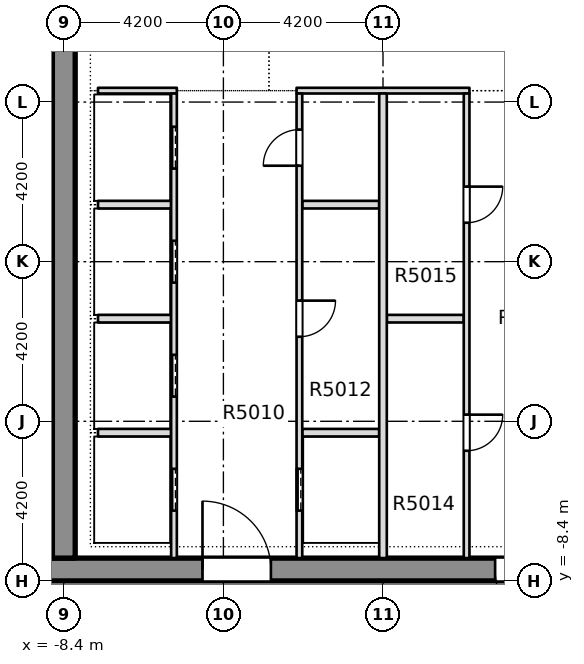
"""IFC4 building model, lengths in metres.
Left out: names, types, materials, properties, quantities, classifications, styles, units other than length and angle.
Written with IfcOpenShell. Run it as: python <this file> out.ifc"""

import sys

from ifc_helpers import new_model, si_unit, direction, frame, frame_2d, origin, place, context, subcontext, project, spatial, rectangle, extrude, element, fill, save


model = new_model("IFC4")
c1 = context("Model", 3, precision=1e-05, world=origin(), true_north=direction((0.0, 1.0)))
c2 = subcontext(c1, "Body", "Model", "MODEL_VIEW")
j1 = project(units=[si_unit("LENGTHUNIT", "METRE"), si_unit("PLANEANGLEUNIT", "RADIAN")], contexts=[c1])
p1 = place(None, origin())
s1 = spatial("IfcSite", under=j1, at=p1, CompositionType="ELEMENT")
p2 = place(p1, origin())
s2 = spatial("IfcBuilding", under=s1, at=p2, CompositionType="ELEMENT")
p3 = place(p2, frame((0.0, 0.0, 192.8)))
s3 = spatial("IfcBuildingStorey", under=s2, at=p3, CompositionType="ELEMENT", Elevation=192.8)
p4 = place(p3, frame((-12.0, -8.1, -0.4), z_axis=(0.0, 0.0, 1.0), x_axis=(1.0, 0.0, 0.0)))
e1 = element("IfcWall", 1, at=p4, inside=s3, PredefinedType="SHEAR", context=c2, shape_type="SweptSolid", body=[
    extrude(rectangle(XDim=24.0, YDim=0.6, at=frame_2d((12.0, 0.0))), origin(), (0.0, 0.0, 1.0), 3.45),
])
p5 = place(p4, frame((7.25, 0.0, 0.4)))
e2 = element("IfcOpeningElement", 2, at=p5, cuts=e1, PredefinedType="OPENING", context=c2, shape_type="SweptSolid", body=[
    extrude(rectangle(XDim=1.8, YDim=2.1, at=frame_2d((0.9, 1.05))), frame((0.0, 0.31, 0.0), z_axis=(0.0, -1.0, 0.0), x_axis=(1.0, 0.0, 0.0)), (0.0, 0.0, 1.0), 0.62),
])
p6 = place(p4, frame((14.95, 0.0, 0.4)))
e3 = element("IfcOpeningElement", 3, at=p6, cuts=e1, PredefinedType="OPENING", context=c2, shape_type="SweptSolid", body=[
    extrude(rectangle(XDim=1.8, YDim=2.1, at=frame_2d((0.9, 1.05))), frame((0.0, 0.31, 0.0), z_axis=(0.0, -1.0, 0.0), x_axis=(1.0, 0.0, 0.0)), (0.0, 0.0, 1.0), 0.62),
])
p7 = place(p3, frame((-8.4, -7.8, -0.4), z_axis=(0.0, 0.0, 1.0), x_axis=(0.0, 1.0, 0.0)))
e4 = element("IfcWall", 4, at=p7, inside=s3, PredefinedType="SHEAR", context=c2, shape_type="SweptSolid", body=[
    extrude(rectangle(XDim=28.95, YDim=0.6, at=frame_2d((14.475, 0.0))), origin(), (0.0, 0.0, 1.0), 3.45),
])
p8 = place(p7, frame((18.7, 0.0, 0.4)))
e5 = element("IfcOpeningElement", 5, at=p8, cuts=e4, PredefinedType="OPENING", context=c2, shape_type="SweptSolid", body=[
    extrude(rectangle(XDim=1.2, YDim=2.1, at=frame_2d((0.6, 1.05))), frame((0.0, 0.31, 0.0), z_axis=(0.0, -1.0, 0.0), x_axis=(1.0, 0.0, 0.0)), (0.0, 0.0, 1.0), 0.62),
])
p9 = place(p3, frame((-7.5, -4.5, 0.0), z_axis=(0.0, 0.0, 1.0), x_axis=(1.0, 0.0, 0.0)))
e6 = element("IfcWall", 6, at=p9, inside=s3, PredefinedType="PARTITIONING", context=c2, shape_type="SweptSolid", body=[
    extrude(rectangle(XDim=1.925, YDim=0.2, at=frame_2d((0.962, 0.0))), origin(), (0.0, 0.0, 1.0), 3.05),
])
p10 = place(p3, frame((-2.125, -4.5, 0.0), z_axis=(0.0, 0.0, 1.0), x_axis=(1.0, 0.0, 0.0)))
e7 = element("IfcWall", 7, at=p10, inside=s3, PredefinedType="PARTITIONING", context=c2, shape_type="SweptSolid", body=[
    extrude(rectangle(XDim=2.025, YDim=0.2, at=frame_2d((1.012, 0.0))), origin(), (0.0, 0.0, 1.0), 3.05),
])
p11 = place(p3, frame((-7.5, -1.5, 0.0), z_axis=(0.0, 0.0, 1.0), x_axis=(1.0, 0.0, 0.0)))
e8 = element("IfcWall", 8, at=p11, inside=s3, PredefinedType="PARTITIONING", context=c2, shape_type="SweptSolid", body=[
    extrude(rectangle(XDim=1.925, YDim=0.2, at=frame_2d((0.962, 0.0))), origin(), (0.0, 0.0, 1.0), 3.05),
])
p12 = place(p3, frame((0.1, -1.5, 0.0), z_axis=(0.0, 0.0, 1.0), x_axis=(1.0, 0.0, 0.0)))
e9 = element("IfcWall", 9, at=p12, inside=s3, PredefinedType="PARTITIONING", context=c2, shape_type="SweptSolid", body=[
    extrude(rectangle(XDim=2.025, YDim=0.2, at=frame_2d((1.012, 0.0))), origin(), (0.0, 0.0, 1.0), 3.05),
])
p13 = place(p3, frame((-7.5, 1.5, 0.0), z_axis=(0.0, 0.0, 1.0), x_axis=(1.0, 0.0, 0.0)))
e10 = element("IfcWall", 10, at=p13, inside=s3, PredefinedType="PARTITIONING", context=c2, shape_type="SweptSolid", body=[
    extrude(rectangle(XDim=1.925, YDim=0.2, at=frame_2d((0.962, 0.0))), origin(), (0.0, 0.0, 1.0), 3.05),
])
p14 = place(p3, frame((-2.125, 1.5, 0.0), z_axis=(0.0, 0.0, 1.0), x_axis=(1.0, 0.0, 0.0)))
e11 = element("IfcWall", 11, at=p14, inside=s3, PredefinedType="PARTITIONING", context=c2, shape_type="SweptSolid", body=[
    extrude(rectangle(XDim=2.025, YDim=0.2, at=frame_2d((1.012, 0.0))), origin(), (0.0, 0.0, 1.0), 3.05),
])
p15 = place(p3, frame((-7.5, 4.5, 0.0), z_axis=(0.0, 0.0, 1.0), x_axis=(1.0, 0.0, 0.0)))
e12 = element("IfcWall", 12, at=p15, inside=s3, PredefinedType="PARTITIONING", context=c2, shape_type="SweptSolid", body=[
    extrude(rectangle(XDim=2.075, YDim=0.15, at=frame_2d((1.038, 0.0))), origin(), (0.0, 0.0, 1.0), 3.05),
])
p16 = place(p3, frame((-2.275, 4.5, 0.0), z_axis=(0.0, 0.0, 1.0), x_axis=(1.0, 0.0, 0.0)))
e13 = element("IfcWall", 13, at=p16, inside=s3, PredefinedType="PARTITIONING", context=c2, shape_type="SweptSolid", body=[
    extrude(rectangle(XDim=4.55, YDim=0.15, at=frame_2d((2.275, 0.0))), origin(), (0.0, 0.0, 1.0), 3.05),
])
p17 = place(p3, frame((-5.5, -7.799, 0.0), z_axis=(0.0, 0.0, 1.0), x_axis=(0.0, 1.0, 0.0)))
e14 = element("IfcWall", 14, at=p17, inside=s3, PredefinedType="PARTITIONING", context=c2, shape_type="SweptSolid", body=[
    extrude(rectangle(XDim=12.224, YDim=0.15, at=frame_2d((6.112, 0.0))), origin(), (0.0, 0.0, 1.0), 3.05),
])
p18 = place(p17, frame((1.249, 0.0, 0.0)))
e15 = element("IfcOpeningElement", 15, at=p18, cuts=e14, PredefinedType="OPENING", context=c2, shape_type="SweptSolid", body=[
    extrude(rectangle(XDim=1.1, YDim=2.1, at=frame_2d((0.55, 1.05))), frame((0.0, 0.085, 0.0), z_axis=(0.0, -1.0, 0.0), x_axis=(1.0, 0.0, 0.0)), (0.0, 0.0, 1.0), 0.17),
])
p19 = place(p17, frame((4.249, 0.0, 0.0)))
e16 = element("IfcOpeningElement", 16, at=p19, cuts=e14, PredefinedType="OPENING", context=c2, shape_type="SweptSolid", body=[
    extrude(rectangle(XDim=1.1, YDim=2.1, at=frame_2d((0.55, 1.05))), frame((0.0, 0.085, 0.0), z_axis=(0.0, -1.0, 0.0), x_axis=(1.0, 0.0, 0.0)), (0.0, 0.0, 1.0), 0.17),
])
p20 = place(p17, frame((7.249, 0.0, 0.0)))
e17 = element("IfcOpeningElement", 17, at=p20, cuts=e14, PredefinedType="OPENING", context=c2, shape_type="SweptSolid", body=[
    extrude(rectangle(XDim=1.1, YDim=2.1, at=frame_2d((0.55, 1.05))), frame((0.0, 0.085, 0.0), z_axis=(0.0, -1.0, 0.0), x_axis=(1.0, 0.0, 0.0)), (0.0, 0.0, 1.0), 0.17),
])
p21 = place(p17, frame((10.249, 0.0, 0.0)))
e18 = element("IfcOpeningElement", 18, at=p21, cuts=e14, PredefinedType="OPENING", context=c2, shape_type="SweptSolid", body=[
    extrude(rectangle(XDim=1.1, YDim=2.1, at=frame_2d((0.55, 1.05))), frame((0.0, 0.085, 0.0), z_axis=(0.0, -1.0, 0.0), x_axis=(1.0, 0.0, 0.0)), (0.0, 0.0, 1.0), 0.17),
])
p22 = place(p3, frame((-2.2, -7.799, 0.0), z_axis=(0.0, 0.0, 1.0), x_axis=(0.0, 1.0, 0.0)))
e19 = element("IfcWall", 19, at=p22, inside=s3, PredefinedType="PARTITIONING", context=c2, shape_type="SweptSolid", body=[
    extrude(rectangle(XDim=12.224, YDim=0.15, at=frame_2d((6.112, 0.0))), origin(), (0.0, 0.0, 1.0), 3.05),
])
p23 = place(p22, frame((1.249, 0.0, 0.0)))
e20 = element("IfcOpeningElement", 20, at=p23, cuts=e19, PredefinedType="OPENING", context=c2, shape_type="SweptSolid", body=[
    extrude(rectangle(XDim=1.1, YDim=2.1, at=frame_2d((0.55, 1.05))), frame((0.0, 0.085, 0.0), z_axis=(0.0, -1.0, 0.0), x_axis=(1.0, 0.0, 0.0)), (0.0, 0.0, 1.0), 0.17),
])
p24 = place(p22, frame((5.824, 0.0, 0.0)))
e21 = element("IfcOpeningElement", 21, at=p24, cuts=e19, PredefinedType="OPENING", context=c2, shape_type="SweptSolid", body=[
    extrude(rectangle(XDim=0.95, YDim=2.1, at=frame_2d((0.475, 1.05))), frame((0.0, 0.085, 0.0), z_axis=(0.0, -1.0, 0.0), x_axis=(1.0, 0.0, 0.0)), (0.0, 0.0, 1.0), 0.17),
])
p25 = place(p22, frame((10.324, 0.0, 0.0)))
e22 = element("IfcOpeningElement", 22, at=p25, cuts=e19, PredefinedType="OPENING", context=c2, shape_type="SweptSolid", body=[
    extrude(rectangle(XDim=0.95, YDim=2.1, at=frame_2d((0.475, 1.05))), frame((0.0, 0.085, 0.0), z_axis=(0.0, -1.0, 0.0), x_axis=(1.0, 0.0, 0.0)), (0.0, 0.0, 1.0), 0.17),
])
p26 = place(p3, frame((0.0, -7.799, 0.0), z_axis=(0.0, 0.0, 1.0), x_axis=(0.0, 1.0, 0.0)))
e23 = element("IfcWall", 23, at=p26, inside=s3, PredefinedType="PARTITIONING", context=c2, shape_type="SweptSolid", body=[
    extrude(rectangle(XDim=12.224, YDim=0.2, at=frame_2d((6.112, 0.0))), origin(), (0.0, 0.0, 1.0), 3.05),
])
p27 = place(p3, frame((2.2, -7.799, 0.0), z_axis=(0.0, 0.0, 1.0), x_axis=(0.0, 1.0, 0.0)))
e24 = element("IfcWall", 24, at=p27, inside=s3, PredefinedType="PARTITIONING", context=c2, shape_type="SweptSolid", body=[
    extrude(rectangle(XDim=12.224, YDim=0.15, at=frame_2d((6.112, 0.0))), origin(), (0.0, 0.0, 1.0), 3.05),
])
p28 = place(p27, frame((2.824, 0.0, 0.0)))
e25 = element("IfcOpeningElement", 25, at=p28, cuts=e24, PredefinedType="OPENING", context=c2, shape_type="SweptSolid", body=[
    extrude(rectangle(XDim=0.95, YDim=2.1, at=frame_2d((0.475, 1.05))), frame((0.0, 0.085, 0.0), z_axis=(0.0, -1.0, 0.0), x_axis=(1.0, 0.0, 0.0)), (0.0, 0.0, 1.0), 0.17),
])
p29 = place(p27, frame((8.824, 0.0, 0.0)))
e26 = element("IfcOpeningElement", 26, at=p29, cuts=e24, PredefinedType="OPENING", context=c2, shape_type="SweptSolid", body=[
    extrude(rectangle(XDim=0.95, YDim=2.1, at=frame_2d((0.475, 1.05))), frame((0.0, 0.085, 0.0), z_axis=(0.0, -1.0, 0.0), x_axis=(1.0, 0.0, 0.0)), (0.0, 0.0, 1.0), 0.17),
])
p30 = place(p18, origin())
e27 = element("IfcDoor", 27, at=p30, inside=s3, OperationType="SLIDING_TO_LEFT", PredefinedType="DOOR", context=c2, shape_type="SweptSolid", body=[
    extrude(rectangle(XDim=1.1, YDim=2.1, at=frame_2d((0.55, 1.05))), frame((0.0, 0.025, 0.0), z_axis=(0.0, -1.0, 0.0), x_axis=(1.0, 0.0, 0.0)), (0.0, 0.0, 1.0), 0.05),
])
fill(e15, e27)
p31 = place(p19, origin())
e28 = element("IfcDoor", 28, at=p31, inside=s3, OperationType="SLIDING_TO_LEFT", PredefinedType="DOOR", context=c2, shape_type="SweptSolid", body=[
    extrude(rectangle(XDim=1.1, YDim=2.1, at=frame_2d((0.55, 1.05))), frame((0.0, 0.025, 0.0), z_axis=(0.0, -1.0, 0.0), x_axis=(1.0, 0.0, 0.0)), (0.0, 0.0, 1.0), 0.05),
])
fill(e16, e28)
p32 = place(p20, origin())
e29 = element("IfcDoor", 29, at=p32, inside=s3, OperationType="SLIDING_TO_LEFT", PredefinedType="DOOR", context=c2, shape_type="SweptSolid", body=[
    extrude(rectangle(XDim=1.1, YDim=2.1, at=frame_2d((0.55, 1.05))), frame((0.0, 0.025, 0.0), z_axis=(0.0, -1.0, 0.0), x_axis=(1.0, 0.0, 0.0)), (0.0, 0.0, 1.0), 0.05),
])
fill(e17, e29)
p33 = place(p21, origin())
e30 = element("IfcDoor", 30, at=p33, inside=s3, OperationType="SLIDING_TO_LEFT", PredefinedType="DOOR", context=c2, shape_type="SweptSolid", body=[
    extrude(rectangle(XDim=1.1, YDim=2.1, at=frame_2d((0.55, 1.05))), frame((0.0, 0.025, 0.0), z_axis=(0.0, -1.0, 0.0), x_axis=(1.0, 0.0, 0.0)), (0.0, 0.0, 1.0), 0.05),
])
fill(e18, e30)
p34 = place(p23, origin())
e31 = element("IfcDoor", 31, at=p34, inside=s3, OperationType="SLIDING_TO_LEFT", PredefinedType="DOOR", context=c2, shape_type="SweptSolid", body=[
    extrude(rectangle(XDim=1.1, YDim=2.1, at=frame_2d((0.55, 1.05))), frame((0.0, 0.025, 0.0), z_axis=(0.0, -1.0, 0.0), x_axis=(1.0, 0.0, 0.0)), (0.0, 0.0, 1.0), 0.05),
])
fill(e20, e31)
p35 = place(p24, origin())
e32 = element("IfcDoor", 32, at=p35, inside=s3, OperationType="SINGLE_SWING_LEFT", PredefinedType="DOOR", context=c2, shape_type="SweptSolid", body=[
    extrude(rectangle(XDim=0.95, YDim=2.1, at=frame_2d((0.475, 1.05))), frame((0.0, 0.025, 0.0), z_axis=(0.0, -1.0, 0.0), x_axis=(1.0, 0.0, 0.0)), (0.0, 0.0, 1.0), 0.05),
])
fill(e21, e32)
p36 = place(p25, origin())
e33 = element("IfcDoor", 33, at=p36, inside=s3, OperationType="SINGLE_SWING_RIGHT", PredefinedType="DOOR", context=c2, shape_type="SweptSolid", body=[
    extrude(rectangle(XDim=0.95, YDim=2.1, at=frame_2d((0.475, 1.05))), frame((0.0, 0.025, 0.0), z_axis=(0.0, -1.0, 0.0), x_axis=(1.0, 0.0, 0.0)), (0.0, 0.0, 1.0), 0.05),
])
fill(e22, e33)
p37 = place(p28, origin())
e34 = element("IfcDoor", 34, at=p37, inside=s3, OperationType="SINGLE_SWING_RIGHT", PredefinedType="DOOR", context=c2, shape_type="SweptSolid", body=[
    extrude(rectangle(XDim=0.95, YDim=2.1, at=frame_2d((0.475, 1.05))), frame((0.0, 0.025, 0.0), z_axis=(0.0, -1.0, 0.0), x_axis=(1.0, 0.0, 0.0)), (0.0, 0.0, 1.0), 0.05),
])
fill(e25, e34)
p38 = place(p29, origin())
e35 = element("IfcDoor", 35, at=p38, inside=s3, OperationType="SINGLE_SWING_RIGHT", PredefinedType="DOOR", context=c2, shape_type="SweptSolid", body=[
    extrude(rectangle(XDim=0.95, YDim=2.1, at=frame_2d((0.475, 1.05))), frame((0.0, 0.025, 0.0), z_axis=(0.0, -1.0, 0.0), x_axis=(1.0, 0.0, 0.0)), (0.0, 0.0, 1.0), 0.05),
])
fill(e26, e35)
p39 = place(p5, origin())
e36 = element("IfcDoor", 36, at=p39, inside=s3, OperationType="SINGLE_SWING_LEFT", PredefinedType="DOOR", context=c2, shape_type="SweptSolid", body=[
    extrude(rectangle(XDim=1.8, YDim=2.1, at=frame_2d((0.9, 1.05))), frame((0.0, 0.025, 0.0), z_axis=(0.0, -1.0, 0.0), x_axis=(1.0, 0.0, 0.0)), (0.0, 0.0, 1.0), 0.05),
])
fill(e2, e36)
p40 = place(p6, origin())
e37 = element("IfcDoor", 37, at=p40, inside=s3, OperationType="SINGLE_SWING_LEFT", PredefinedType="DOOR", context=c2, shape_type="SweptSolid", body=[
    extrude(rectangle(XDim=1.8, YDim=2.1, at=frame_2d((0.9, 1.05))), frame((0.0, 0.025, 0.0), z_axis=(0.0, -1.0, 0.0), x_axis=(1.0, 0.0, 0.0)), (0.0, 0.0, 1.0), 0.05),
])
fill(e3, e37)
save(model, sys.argv[1])
